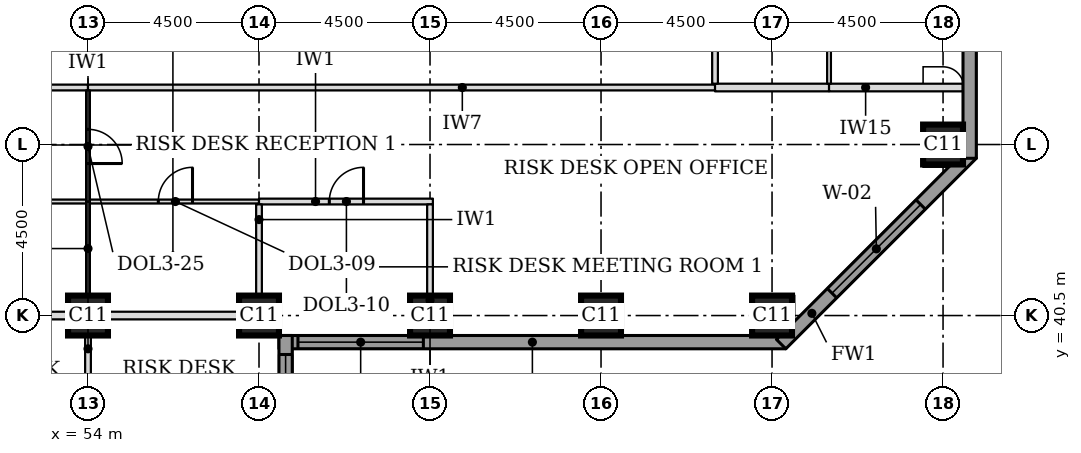
"""IFC4 building model, lengths in metres.
Left out: names, types, materials, properties, quantities, classifications, styles, units other than length and angle.
Written with IfcOpenShell. Run it as: python <this file> out.ifc"""

import sys

from ifc_helpers import new_model, si_unit, direction, frame, frame_2d, origin, origin_2d, place, context, subcontext, project, spatial, rectangle, extrude, element, fill, save


model = new_model("IFC4")
c1 = context("Model", 3, precision=1e-05, world=origin(), true_north=direction((0.0, 1.0)))
c2 = subcontext(c1, "Body", "Model", "MODEL_VIEW")
j1 = project(units=[si_unit("LENGTHUNIT", "METRE"), si_unit("PLANEANGLEUNIT", "RADIAN")], contexts=[c1])
p1 = place(None, origin())
s1 = spatial("IfcSite", under=j1, at=p1, CompositionType="ELEMENT")
p2 = place(p1, origin())
s2 = spatial("IfcBuilding", under=s1, at=p2, CompositionType="ELEMENT")
p3 = place(p2, frame((0.0, 0.0, 93.7)))
s3 = spatial("IfcBuildingStorey", under=s2, at=p3, CompositionType="ELEMENT", Elevation=93.7)
for number, where, z_axis, x_axis in (
    (1, (54.0, 40.5, 0.0), (0.0, 0.0, 1.0), (1.0, 0.0, 0.0)),
    (2, (58.5, 40.5, 0.0), (0.0, 0.0, 1.0), (1.0, 0.0, 0.0)),
    (3, (63.0, 40.5, 0.0), (0.0, 0.0, 1.0), (1.0, 0.0, 0.0)),
    (4, (67.5, 40.5, 0.0), (0.0, 0.0, 1.0), (1.0, 0.0, 0.0)),
    (5, (72.0, 40.5, 0.0), (0.0, 0.0, 1.0), (1.0, 0.0, 0.0)),
    (6, (76.5, 45.0, 0.0), (0.0, 0.0, 1.0), (1.0, 0.0, 0.0)),
):
    element("IfcColumn", number, at=place(p3, frame(where, z_axis=z_axis, x_axis=x_axis)), inside=s3, PredefinedType="COLUMN", context=c2, shape_type="SweptSolid", body=[
        extrude(rectangle(XDim=1.05, YDim=1.05, at=origin_2d()), origin(), (0.0, 0.0, 1.0), 3.7),
    ])
p4 = place(p3, frame((59.025, 39.8, 0.0), z_axis=(0.0, 0.0, 1.0), x_axis=(1.0, 0.0, 0.0)))
e7 = element("IfcWall", 7, at=p4, inside=s3, PredefinedType="STANDARD", context=c2, shape_type="SweptSolid", body=[
    extrude(rectangle(XDim=13.337, YDim=0.35, at=frame_2d((6.669, 0.0))), origin(), (0.0, 0.0, 1.0), 3.525),
])
p5 = place(p4, frame((0.5, 0.0, 0.9)))
e8 = element("IfcOpeningElement", 8, at=p5, cuts=e7, PredefinedType="OPENING", context=c2, shape_type="SweptSolid", body=[
    extrude(rectangle(XDim=3.3, YDim=1.9, at=frame_2d((1.65, 0.95))), frame((0.0, 0.185, 0.0), z_axis=(0.0, -1.0, 0.0), x_axis=(1.0, 0.0, 0.0)), (0.0, 0.0, 1.0), 0.37),
])
p6 = place(p3, frame((72.239, 39.749, 0.0), z_axis=(0.0, 0.0, 1.0), x_axis=(0.707106781187, 0.707106781187, 0.0)))
e9 = element("IfcWall", 9, at=p6, inside=s3, PredefinedType="STANDARD", context=c2, shape_type="SweptSolid", body=[
    extrude(rectangle(XDim=7.089, YDim=0.35, at=frame_2d((3.544, 0.0))), origin(), (0.0, 0.0, 1.0), 3.525),
])
p7 = place(p6, frame((1.894, 0.0, 0.9)))
e10 = element("IfcOpeningElement", 10, at=p7, cuts=e9, PredefinedType="OPENING", context=c2, shape_type="SweptSolid", body=[
    extrude(rectangle(XDim=3.3, YDim=1.9, at=frame_2d((1.65, 0.95))), frame((0.0, 0.185, 0.0), z_axis=(0.0, -1.0, 0.0), x_axis=(1.0, 0.0, 0.0)), (0.0, 0.0, 1.0), 0.37),
])
p8 = place(p3, frame((77.2, 44.638, 0.0), z_axis=(0.0, 0.0, 1.0), x_axis=(0.0, 1.0, 0.0)))
e11 = element("IfcWall", 11, at=p8, inside=s3, PredefinedType="STANDARD", context=c2, shape_type="SweptSolid", body=[
    extrude(rectangle(XDim=32.225, YDim=0.35, at=frame_2d((16.112, 0.0))), origin(), (0.0, 0.0, 1.0), 3.525),
])
p9 = place(p8, frame((5.462, 0.0, 0.9)))
e12 = element("IfcOpeningElement", 12, at=p9, cuts=e11, PredefinedType="OPENING", context=c2, shape_type="SweptSolid", body=[
    extrude(rectangle(XDim=3.3, YDim=1.9, at=frame_2d((1.65, 0.95))), frame((0.0, 0.185, 0.0), z_axis=(0.0, -1.0, 0.0), x_axis=(1.0, 0.0, 0.0)), (0.0, 0.0, 1.0), 0.37),
])
p10 = place(p8, frame((9.962, 0.0, 0.9)))
e13 = element("IfcOpeningElement", 13, at=p10, cuts=e11, PredefinedType="OPENING", context=c2, shape_type="SweptSolid", body=[
    extrude(rectangle(XDim=3.3, YDim=1.9, at=frame_2d((1.65, 0.95))), frame((0.0, 0.185, 0.0), z_axis=(0.0, -1.0, 0.0), x_axis=(1.0, 0.0, 0.0)), (0.0, 0.0, 1.0), 0.37),
])
p11 = place(p8, frame((14.462, 0.0, 0.9)))
e14 = element("IfcOpeningElement", 14, at=p11, cuts=e11, PredefinedType="OPENING", context=c2, shape_type="SweptSolid", body=[
    extrude(rectangle(XDim=3.3, YDim=1.9, at=frame_2d((1.65, 0.95))), frame((0.0, 0.185, 0.0), z_axis=(0.0, -1.0, 0.0), x_axis=(1.0, 0.0, 0.0)), (0.0, 0.0, 1.0), 0.37),
])
p12 = place(p8, frame((18.962, 0.0, 0.9)))
e15 = element("IfcOpeningElement", 15, at=p12, cuts=e11, PredefinedType="OPENING", context=c2, shape_type="SweptSolid", body=[
    extrude(rectangle(XDim=3.3, YDim=1.9, at=frame_2d((1.65, 0.95))), frame((0.0, 0.185, 0.0), z_axis=(0.0, -1.0, 0.0), x_axis=(1.0, 0.0, 0.0)), (0.0, 0.0, 1.0), 0.37),
])
p13 = place(p8, frame((23.462, 0.0, 0.9)))
e16 = element("IfcOpeningElement", 16, at=p13, cuts=e11, PredefinedType="OPENING", context=c2, shape_type="SweptSolid", body=[
    extrude(rectangle(XDim=3.3, YDim=1.9, at=frame_2d((1.65, 0.95))), frame((0.0, 0.185, 0.0), z_axis=(0.0, -1.0, 0.0), x_axis=(1.0, 0.0, 0.0)), (0.0, 0.0, 1.0), 0.37),
])
p14 = place(p3, frame((59.2, 22.138, 0.0), z_axis=(0.0, 0.0, 1.0), x_axis=(0.0, 1.0, 0.0)))
e17 = element("IfcWall", 17, at=p14, inside=s3, PredefinedType="STANDARD", context=c2, shape_type="SweptSolid", body=[
    extrude(rectangle(XDim=17.837, YDim=0.35, at=frame_2d((8.919, 0.0))), origin(), (0.0, 0.0, 1.0), 3.525),
])
p15 = place(p14, frame((5.462, 0.0, 0.9)))
e18 = element("IfcOpeningElement", 18, at=p15, cuts=e17, PredefinedType="OPENING", context=c2, shape_type="SweptSolid", body=[
    extrude(rectangle(XDim=3.3, YDim=1.9, at=frame_2d((1.65, 0.95))), frame((0.0, 0.185, 0.0), z_axis=(0.0, -1.0, 0.0), x_axis=(1.0, 0.0, 0.0)), (0.0, 0.0, 1.0), 0.37),
])
p16 = place(p14, frame((14.037, 0.0, 0.9)))
e19 = element("IfcOpeningElement", 19, at=p16, cuts=e17, PredefinedType="OPENING", context=c2, shape_type="SweptSolid", body=[
    extrude(rectangle(XDim=3.3, YDim=1.9, at=frame_2d((1.65, 0.95))), frame((0.0, 0.185, 0.0), z_axis=(0.0, -1.0, 0.0), x_axis=(1.0, 0.0, 0.0)), (0.0, 0.0, 1.0), 0.37),
])
p17 = place(p3, frame((50.015, 40.5, 0.0), z_axis=(0.0, 0.0, 1.0), x_axis=(1.0, 0.0, 0.0)))
e20 = element("IfcWall", 20, at=p17, inside=s3, PredefinedType="PARTITIONING", context=c2, shape_type="SweptSolid", body=[
    extrude(rectangle(XDim=3.46, YDim=0.2, at=frame_2d((1.73, 0.0))), origin(), (0.0, 0.0, 1.0), 2.8),
])
p18 = place(p3, frame((54.495, 40.5, 0.0), z_axis=(0.0, 0.0, 1.0), x_axis=(1.0, 0.0, 0.0)))
e21 = element("IfcWall", 21, at=p18, inside=s3, PredefinedType="PARTITIONING", context=c2, shape_type="SweptSolid", body=[
    extrude(rectangle(XDim=3.48, YDim=0.2, at=frame_2d((1.74, 0.0))), origin(), (0.0, 0.0, 1.0), 2.8),
])
p19 = place(p3, frame((49.575, 43.5, 0.0), z_axis=(0.0, 0.0, 1.0), x_axis=(1.0, 0.0, 0.0)))
e22 = element("IfcWall", 22, at=p19, inside=s3, PredefinedType="PARTITIONING", context=c2, shape_type="SweptSolid", body=[
    extrude(rectangle(XDim=4.375, YDim=0.1, at=frame_2d((2.188, 0.0))), origin(), (0.0, 0.0, 1.0), 3.55),
])
p20 = place(p19, frame((1.75, 0.0, 0.0)))
e23 = element("IfcOpeningElement", 23, at=p20, cuts=e22, PredefinedType="OPENING", context=c2, shape_type="SweptSolid", body=[
    extrude(rectangle(XDim=0.9, YDim=2.1, at=frame_2d((0.45, 1.05))), frame((0.0, 0.06, 0.0), z_axis=(0.0, -1.0, 0.0), x_axis=(1.0, 0.0, 0.0)), (0.0, 0.0, 1.0), 0.12),
])
p21 = place(p3, frame((54.05, 43.5, 0.0), z_axis=(0.0, 0.0, 1.0), x_axis=(1.0, 0.0, 0.0)))
e24 = element("IfcWall", 24, at=p21, inside=s3, PredefinedType="PARTITIONING", context=c2, shape_type="SweptSolid", body=[
    extrude(rectangle(XDim=4.45, YDim=0.1, at=frame_2d((2.225, 0.0))), origin(), (0.0, 0.0, 1.0), 3.55),
])
p22 = place(p21, frame((1.8, 0.0, 0.0)))
e25 = element("IfcOpeningElement", 25, at=p22, cuts=e24, PredefinedType="OPENING", context=c2, shape_type="SweptSolid", body=[
    extrude(rectangle(XDim=0.9, YDim=2.1, at=frame_2d((0.45, 1.05))), frame((0.0, 0.06, 0.0), z_axis=(0.0, -1.0, 0.0), x_axis=(1.0, 0.0, 0.0)), (0.0, 0.0, 1.0), 0.12),
])
p23 = place(p3, frame((58.5, 43.5, 0.0), z_axis=(0.0, 0.0, 1.0), x_axis=(1.0, 0.0, 0.0)))
e26 = element("IfcWall", 26, at=p23, inside=s3, PredefinedType="PARTITIONING", context=c2, shape_type="SweptSolid", body=[
    extrude(rectangle(XDim=4.575, YDim=0.15, at=frame_2d((2.288, 0.0))), origin(), (0.0, 0.0, 1.0), 3.55),
])
p24 = place(p23, frame((1.85, 0.0, 0.0)))
e27 = element("IfcOpeningElement", 27, at=p24, cuts=e26, PredefinedType="OPENING", context=c2, shape_type="SweptSolid", body=[
    extrude(rectangle(XDim=0.9, YDim=2.1, at=frame_2d((0.45, 1.05))), frame((0.0, 0.085, 0.0), z_axis=(0.0, -1.0, 0.0), x_axis=(1.0, 0.0, 0.0)), (0.0, 0.0, 1.0), 0.17),
])
p25 = place(p3, frame((49.425, 46.5, 0.0), z_axis=(0.0, 0.0, 1.0), x_axis=(1.0, 0.0, 0.0)))
e28 = element("IfcWall", 28, at=p25, inside=s3, PredefinedType="PARTITIONING", context=c2, shape_type="SweptSolid", body=[
    extrude(rectangle(XDim=4.575, YDim=0.15, at=frame_2d((2.288, 0.0))), origin(), (0.0, 0.0, 1.0), 3.55),
])
p26 = place(p25, frame((1.8, 0.0, 0.0)))
e29 = element("IfcOpeningElement", 29, at=p26, cuts=e28, PredefinedType="OPENING", context=c2, shape_type="SweptSolid", body=[
    extrude(rectangle(XDim=1.0, YDim=2.1, at=frame_2d((0.5, 1.05))), frame((0.0, 0.085, 0.0), z_axis=(0.0, -1.0, 0.0), x_axis=(1.0, 0.0, 0.0)), (0.0, 0.0, 1.0), 0.17),
])
p27 = place(p3, frame((54.0, 46.5, 0.0), z_axis=(0.0, 0.0, 1.0), x_axis=(1.0, 0.0, 0.0)))
e30 = element("IfcWall", 30, at=p27, inside=s3, PredefinedType="PARTITIONING", context=c2, shape_type="SweptSolid", body=[
    extrude(rectangle(XDim=16.5, YDim=0.15, at=frame_2d((8.25, 0.0))), origin(), (0.0, 0.0, 1.0), 3.55),
])
p28 = place(p3, frame((70.5, 46.5, 0.0), z_axis=(0.0, 0.0, 1.0), x_axis=(1.0, 0.0, 0.0)))
e31 = element("IfcWall", 31, at=p28, inside=s3, PredefinedType="PARTITIONING", context=c2, shape_type="SweptSolid", body=[
    extrude(rectangle(XDim=3.0, YDim=0.2, at=frame_2d((1.5, 0.0))), origin(), (0.0, 0.0, 1.0), 3.55),
])
p29 = place(p3, frame((73.5, 46.5, 0.0), z_axis=(0.0, 0.0, 1.0), x_axis=(1.0, 0.0, 0.0)))
e32 = element("IfcWall", 32, at=p29, inside=s3, PredefinedType="PARTITIONING", context=c2, shape_type="SweptSolid", body=[
    extrude(rectangle(XDim=3.525, YDim=0.2, at=frame_2d((1.762, 0.0))), origin(), (0.0, 0.0, 1.0), 3.55),
])
p30 = place(p3, frame((54.0, 36.075, 0.0), z_axis=(0.0, 0.0, 1.0), x_axis=(0.0, 1.0, 0.0)))
e33 = element("IfcWall", 33, at=p30, inside=s3, PredefinedType="PARTITIONING", context=c2, shape_type="SweptSolid", body=[
    extrude(rectangle(XDim=3.9, YDim=0.15, at=frame_2d((1.95, 0.0))), origin(), (0.0, 0.0, 1.0), 3.55),
])
p31 = place(p3, frame((63.0, 39.975, 0.0), z_axis=(0.0, 0.0, 1.0), x_axis=(0.0, 1.0, 0.0)))
e34 = element("IfcWall", 34, at=p31, inside=s3, PredefinedType="PARTITIONING", context=c2, shape_type="SweptSolid", body=[
    extrude(rectangle(XDim=3.45, YDim=0.15, at=frame_2d((1.725, 0.0))), origin(), (0.0, 0.0, 1.0), 3.55),
])
p32 = place(p3, frame((54.0, 41.025, 0.0), z_axis=(0.0, 0.0, 1.0), x_axis=(0.0, 1.0, 0.0)))
e35 = element("IfcWall", 35, at=p32, inside=s3, PredefinedType="PARTITIONING", context=c2, shape_type="SweptSolid", body=[
    extrude(rectangle(XDim=2.475, YDim=0.1, at=frame_2d((1.238, 0.0))), origin(), (0.0, 0.0, 1.0), 3.55),
])
p33 = place(p3, frame((58.5, 41.025, 0.0), z_axis=(0.0, 0.0, 1.0), x_axis=(0.0, 1.0, 0.0)))
e36 = element("IfcWall", 36, at=p33, inside=s3, PredefinedType="PARTITIONING", context=c2, shape_type="SweptSolid", body=[
    extrude(rectangle(XDim=2.4, YDim=0.15, at=frame_2d((1.2, 0.0))), origin(), (0.0, 0.0, 1.0), 3.55),
])
p34 = place(p3, frame((54.0, 43.5, 0.0), z_axis=(0.0, 0.0, 1.0), x_axis=(0.0, 1.0, 0.0)))
e37 = element("IfcWall", 37, at=p34, inside=s3, PredefinedType="PARTITIONING", context=c2, shape_type="SweptSolid", body=[
    extrude(rectangle(XDim=2.925, YDim=0.1, at=frame_2d((1.462, 0.0))), origin(), (0.0, 0.0, 1.0), 3.55),
])
p35 = place(p34, frame((1.0, 0.0, 0.0)))
e38 = element("IfcOpeningElement", 38, at=p35, cuts=e37, PredefinedType="OPENING", context=c2, shape_type="SweptSolid", body=[
    extrude(rectangle(XDim=0.9, YDim=2.1, at=frame_2d((0.45, 1.05))), frame((0.0, 0.06, 0.0), z_axis=(0.0, -1.0, 0.0), x_axis=(1.0, 0.0, 0.0)), (0.0, 0.0, 1.0), 0.12),
])
p36 = place(p3, frame((70.5, 46.6, 0.0), z_axis=(0.0, 0.0, 1.0), x_axis=(0.0, 1.0, 0.0)))
e39 = element("IfcWall", 39, at=p36, inside=s3, PredefinedType="PARTITIONING", context=c2, shape_type="SweptSolid", body=[
    extrude(rectangle(XDim=2.9, YDim=0.15, at=frame_2d((1.45, 0.0))), origin(), (0.0, 0.0, 1.0), 3.55),
])
p37 = place(p3, frame((73.5, 46.6, 0.0), z_axis=(0.0, 0.0, 1.0), x_axis=(0.0, 1.0, 0.0)))
e40 = element("IfcWall", 40, at=p37, inside=s3, PredefinedType="PARTITIONING", context=c2, shape_type="SweptSolid", body=[
    extrude(rectangle(XDim=2.85, YDim=0.1, at=frame_2d((1.425, 0.0))), origin(), (0.0, 0.0, 1.0), 3.55),
])
p38 = place(p5, origin())
e41 = element("IfcWindow", 41, at=p38, inside=s3, PartitioningType="SINGLE_PANEL", PredefinedType="WINDOW", context=c2, shape_type="SweptSolid", body=[
    extrude(rectangle(XDim=3.3, YDim=1.9, at=frame_2d((1.65, 0.95))), frame((0.0, 0.085, 0.0), z_axis=(0.0, -1.0, 0.0), x_axis=(1.0, 0.0, 0.0)), (0.0, 0.0, 1.0), 0.06),
])
fill(e8, e41)
p39 = place(p7, origin())
e42 = element("IfcWindow", 42, at=p39, inside=s3, PartitioningType="SINGLE_PANEL", PredefinedType="WINDOW", context=c2, shape_type="SweptSolid", body=[
    extrude(rectangle(XDim=3.3, YDim=1.9, at=frame_2d((1.65, 0.95))), frame((0.0, 0.085, 0.0), z_axis=(0.0, -1.0, 0.0), x_axis=(1.0, 0.0, 0.0)), (0.0, 0.0, 1.0), 0.06),
])
fill(e10, e42)
p40 = place(p16, origin())
e43 = element("IfcWindow", 43, at=p40, inside=s3, PartitioningType="SINGLE_PANEL", PredefinedType="WINDOW", context=c2, shape_type="SweptSolid", body=[
    extrude(rectangle(XDim=3.3, YDim=1.9, at=frame_2d((1.65, 0.95))), frame((0.0, 0.085, 0.0), z_axis=(0.0, -1.0, 0.0), x_axis=(1.0, 0.0, 0.0)), (0.0, 0.0, 1.0), 0.06),
])
fill(e19, e43)
p41 = place(p35, frame((0.9, 0.0, 0.0), z_axis=(0.0, 0.0, 1.0), x_axis=(-1.0, 0.0, 0.0)))
e44 = element("IfcDoor", 44, at=p41, inside=s3, OperationType="SINGLE_SWING_RIGHT", PredefinedType="DOOR", context=c2, shape_type="SweptSolid", body=[
    extrude(rectangle(XDim=0.9, YDim=2.1, at=frame_2d((0.45, 1.05))), frame((0.0, 0.025, 0.0), z_axis=(0.0, -1.0, 0.0), x_axis=(1.0, 0.0, 0.0)), (0.0, 0.0, 1.0), 0.05),
])
fill(e38, e44)
p42 = place(p22, origin())
e45 = element("IfcDoor", 45, at=p42, inside=s3, OperationType="SINGLE_SWING_RIGHT", PredefinedType="DOOR", context=c2, shape_type="SweptSolid", body=[
    extrude(rectangle(XDim=0.9, YDim=2.1, at=frame_2d((0.45, 1.05))), frame((0.0, 0.025, 0.0), z_axis=(0.0, -1.0, 0.0), x_axis=(1.0, 0.0, 0.0)), (0.0, 0.0, 1.0), 0.05),
])
fill(e25, e45)
p43 = place(p24, origin())
e46 = element("IfcDoor", 46, at=p43, inside=s3, OperationType="SINGLE_SWING_RIGHT", PredefinedType="DOOR", context=c2, shape_type="SweptSolid", body=[
    extrude(rectangle(XDim=0.9, YDim=2.1, at=frame_2d((0.45, 1.05))), frame((0.0, 0.025, 0.0), z_axis=(0.0, -1.0, 0.0), x_axis=(1.0, 0.0, 0.0)), (0.0, 0.0, 1.0), 0.05),
])
fill(e27, e46)
save(model, sys.argv[1])
